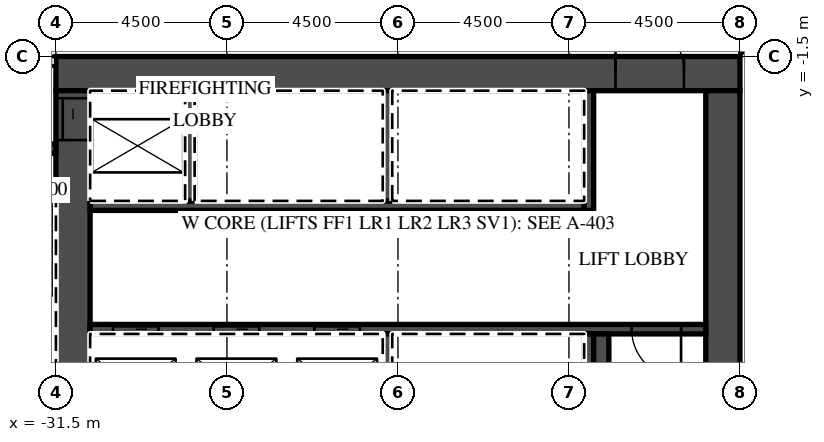
"""IFC4 building model, lengths in metres.
Left out: names, types, materials, properties, quantities, classifications, styles, units other than length and angle.
Written with IfcOpenShell. Run it as: python <this file> out.ifc"""

import sys

from ifc_helpers import new_model, si_unit, direction, frame, frame_2d, origin, place, context, subcontext, project, spatial, rectangle, extrude, element, fill, save


model = new_model("IFC4")
c1 = context("Model", 3, precision=1e-05, world=origin(), true_north=direction((0.0, 1.0)))
c2 = subcontext(c1, "Body", "Model", "MODEL_VIEW")
j1 = project(units=[si_unit("LENGTHUNIT", "METRE"), si_unit("PLANEANGLEUNIT", "RADIAN")], contexts=[c1])
p1 = place(None, origin())
s1 = spatial("IfcSite", under=j1, at=p1, CompositionType="ELEMENT")
p2 = place(p1, origin())
s2 = spatial("IfcBuilding", under=s1, at=p2, CompositionType="ELEMENT")
p3 = place(p2, frame((0.0, 0.0, 114.1)))
s3 = spatial("IfcBuildingStorey", under=s2, at=p3, CompositionType="ELEMENT", Elevation=114.1)
p4 = place(p3, frame((-13.5, -1.3, 0.0), z_axis=(0.0, 0.0, 1.0), x_axis=(1.0, 0.0, 0.0)))
e1 = element("IfcWall", 1, at=p4, inside=s3, PredefinedType="PARTITIONING", context=c2, shape_type="SweptSolid", body=[
    extrude(rectangle(XDim=60.932, YDim=0.2, at=frame_2d((30.466, 0.0))), origin(), (0.0, 0.0, 1.0), 3.02),
])
p5 = place(p4, frame((0.575, 0.0, 0.0)))
e2 = element("IfcOpeningElement", 2, at=p5, cuts=e1, PredefinedType="OPENING", context=c2, shape_type="SweptSolid", body=[
    extrude(rectangle(XDim=1.0, YDim=2.1, at=frame_2d((0.5, 1.05))), frame((0.0, 0.11, 0.0), z_axis=(0.0, -1.0, 0.0), x_axis=(1.0, 0.0, 0.0)), (0.0, 0.0, 1.0), 0.22),
])
p6 = place(p4, frame((5.075, 0.0, 0.0)))
e3 = element("IfcOpeningElement", 3, at=p6, cuts=e1, PredefinedType="OPENING", context=c2, shape_type="SweptSolid", body=[
    extrude(rectangle(XDim=1.0, YDim=2.1, at=frame_2d((0.5, 1.05))), frame((0.0, 0.11, 0.0), z_axis=(0.0, -1.0, 0.0), x_axis=(1.0, 0.0, 0.0)), (0.0, 0.0, 1.0), 0.22),
])
p7 = place(p4, frame((11.925, 0.0, 0.0)))
e4 = element("IfcOpeningElement", 4, at=p7, cuts=e1, PredefinedType="OPENING", context=c2, shape_type="SweptSolid", body=[
    extrude(rectangle(XDim=1.0, YDim=2.1, at=frame_2d((0.5, 1.05))), frame((0.0, 0.11, 0.0), z_axis=(0.0, -1.0, 0.0), x_axis=(1.0, 0.0, 0.0)), (0.0, 0.0, 1.0), 0.22),
])
p8 = place(p4, frame((15.938, 0.0, 0.0)))
e5 = element("IfcOpeningElement", 5, at=p8, cuts=e1, PredefinedType="OPENING", context=c2, shape_type="SweptSolid", body=[
    extrude(rectangle(XDim=1.2, YDim=2.1, at=frame_2d((0.6, 1.05))), frame((0.0, 0.11, 0.0), z_axis=(0.0, -1.0, 0.0), x_axis=(1.0, 0.0, 0.0)), (0.0, 0.0, 1.0), 0.22),
])
p9 = place(p4, frame((25.45, 0.0, 0.0)))
e6 = element("IfcOpeningElement", 6, at=p9, cuts=e1, PredefinedType="OPENING", context=c2, shape_type="SweptSolid", body=[
    extrude(rectangle(XDim=1.0, YDim=2.1, at=frame_2d((0.5, 1.05))), frame((0.0, 0.11, 0.0), z_axis=(0.0, -1.0, 0.0), x_axis=(1.0, 0.0, 0.0)), (0.0, 0.0, 1.0), 0.22),
])
p10 = place(p4, frame((27.55, 0.0, 0.0)))
e7 = element("IfcOpeningElement", 7, at=p10, cuts=e1, PredefinedType="OPENING", context=c2, shape_type="SweptSolid", body=[
    extrude(rectangle(XDim=1.0, YDim=2.1, at=frame_2d((0.5, 1.05))), frame((0.0, 0.11, 0.0), z_axis=(0.0, -1.0, 0.0), x_axis=(1.0, 0.0, 0.0)), (0.0, 0.0, 1.0), 0.22),
])
p11 = place(p4, frame((33.938, 0.0, 0.0)))
e8 = element("IfcOpeningElement", 8, at=p11, cuts=e1, PredefinedType="OPENING", context=c2, shape_type="SweptSolid", body=[
    extrude(rectangle(XDim=1.2, YDim=2.1, at=frame_2d((0.6, 1.05))), frame((0.0, 0.11, 0.0), z_axis=(0.0, -1.0, 0.0), x_axis=(1.0, 0.0, 0.0)), (0.0, 0.0, 1.0), 0.22),
])
p12 = place(p4, frame((45.862, 0.0, 0.0)))
e9 = element("IfcOpeningElement", 9, at=p12, cuts=e1, PredefinedType="OPENING", context=c2, shape_type="SweptSolid", body=[
    extrude(rectangle(XDim=1.2, YDim=2.1, at=frame_2d((0.6, 1.05))), frame((0.0, 0.11, 0.0), z_axis=(0.0, -1.0, 0.0), x_axis=(1.0, 0.0, 0.0)), (0.0, 0.0, 1.0), 0.22),
])
p13 = place(p4, frame((52.425, 0.0, 0.0)))
e10 = element("IfcOpeningElement", 10, at=p13, cuts=e1, PredefinedType="OPENING", context=c2, shape_type="SweptSolid", body=[
    extrude(rectangle(XDim=1.0, YDim=2.1, at=frame_2d((0.5, 1.05))), frame((0.0, 0.11, 0.0), z_axis=(0.0, -1.0, 0.0), x_axis=(1.0, 0.0, 0.0)), (0.0, 0.0, 1.0), 0.22),
])
p14 = place(p4, frame((56.95, 0.0, 0.0)))
e11 = element("IfcOpeningElement", 11, at=p14, cuts=e1, PredefinedType="OPENING", context=c2, shape_type="SweptSolid", body=[
    extrude(rectangle(XDim=1.0, YDim=2.1, at=frame_2d((0.5, 1.05))), frame((0.0, 0.11, 0.0), z_axis=(0.0, -1.0, 0.0), x_axis=(1.0, 0.0, 0.0)), (0.0, 0.0, 1.0), 0.22),
])
p15 = place(p4, frame((59.882, 0.0, 0.0)))
e12 = element("IfcOpeningElement", 12, at=p15, cuts=e1, PredefinedType="OPENING", context=c2, shape_type="SweptSolid", body=[
    extrude(rectangle(XDim=0.9, YDim=2.1, at=frame_2d((0.45, 1.05))), frame((0.0, 0.11, 0.0), z_axis=(0.0, -1.0, 0.0), x_axis=(1.0, 0.0, 0.0)), (0.0, 0.0, 1.0), 0.22),
])
p16 = place(p3, frame((-31.5, -1.95, 0.0), z_axis=(0.0, 0.0, 1.0), x_axis=(1.0, 0.0, 0.0)))
e13 = element("IfcWall", 13, at=p16, inside=s3, PredefinedType="SHEAR", context=c2, shape_type="SweptSolid", body=[
    extrude(rectangle(XDim=18.0, YDim=0.9, at=frame_2d((9.0, 0.0))), origin(), (0.0, 0.0, 1.0), 3.02),
])
p17 = place(p16, frame((14.725, 0.0, 0.0)))
e14 = element("IfcOpeningElement", 14, at=p17, cuts=e13, PredefinedType="OPENING", context=c2, shape_type="SweptSolid", body=[
    extrude(rectangle(XDim=1.8, YDim=2.1, at=frame_2d((0.9, 1.05))), frame((0.0, 0.46, 0.0), z_axis=(0.0, -1.0, 0.0), x_axis=(1.0, 0.0, 0.0)), (0.0, 0.0, 1.0), 0.92),
])
p18 = place(p3, frame((-31.05, -15.2, 0.0), z_axis=(0.0, 0.0, 1.0), x_axis=(0.0, 1.0, 0.0)))
e15 = element("IfcWall", 15, at=p18, inside=s3, PredefinedType="SHEAR", context=c2, shape_type="SweptSolid", body=[
    extrude(rectangle(XDim=12.8, YDim=0.9, at=frame_2d((6.4, 0.0))), origin(), (0.0, 0.0, 1.0), 3.02),
])
p19 = place(p18, frame((11.5, 0.0, 0.0)))
e16 = element("IfcOpeningElement", 16, at=p19, cuts=e15, PredefinedType="OPENING", context=c2, shape_type="SweptSolid", body=[
    extrude(rectangle(XDim=1.1, YDim=2.1, at=frame_2d((0.55, 1.05))), frame((0.0, 0.46, 0.0), z_axis=(0.0, -1.0, 0.0), x_axis=(1.0, 0.0, 0.0)), (0.0, 0.0, 1.0), 0.92),
])
p20 = place(p3, frame((-13.95, -14.6, 0.0), z_axis=(0.0, 0.0, 1.0), x_axis=(0.0, 1.0, 0.0)))
e17 = element("IfcWall", 17, at=p20, inside=s3, PredefinedType="SHEAR", context=c2, shape_type="SweptSolid", body=[
    extrude(rectangle(XDim=12.2, YDim=0.9, at=frame_2d((6.1, 0.0))), origin(), (0.0, 0.0, 1.0), 3.02),
])
p21 = place(p3, frame((-30.6, -5.425, 0.0), z_axis=(0.0, 0.0, 1.0), x_axis=(1.0, 0.0, 0.0)))
e18 = element("IfcWall", 18, at=p21, inside=s3, PredefinedType="SHEAR", context=c2, shape_type="SweptSolid", body=[
    extrude(rectangle(XDim=13.0, YDim=0.25, at=frame_2d((6.5, 0.0))), origin(), (0.0, 0.0, 1.0), 3.02),
])
p22 = place(p3, frame((-17.475, -5.55, 0.0), z_axis=(0.0, 0.0, 1.0), x_axis=(0.0, 1.0, 0.0)))
e19 = element("IfcWall", 19, at=p22, inside=s3, PredefinedType="SHEAR", context=c2, shape_type="SweptSolid", body=[
    extrude(rectangle(XDim=3.15, YDim=0.25, at=frame_2d((1.575, 0.0))), origin(), (0.0, 0.0, 1.0), 3.02),
])
for number, where, z_axis, x_axis in (
    (20, (-27.975, -5.3, 0.0), (0.0, 0.0, 1.0), (0.0, 1.0, 0.0)),
    (21, (-22.775, -5.3, 0.0), (0.0, 0.0, 1.0), (0.0, 1.0, 0.0)),
):
    element("IfcWall", number, at=place(p3, frame(where, z_axis=z_axis, x_axis=x_axis)), inside=s3, PredefinedType="SHEAR", context=c2, shape_type="SweptSolid", body=[
        extrude(rectangle(XDim=2.9, YDim=0.25, at=frame_2d((1.45, 0.0))), origin(), (0.0, 0.0, 1.0), 3.02),
    ])
p23 = place(p3, frame((-30.6, -8.675, 0.0), z_axis=(0.0, 0.0, 1.0), x_axis=(1.0, 0.0, 0.0)))
e22 = element("IfcWall", 22, at=p23, inside=s3, PredefinedType="SHEAR", context=c2, shape_type="SweptSolid", body=[
    extrude(rectangle(XDim=16.2, YDim=0.25, at=frame_2d((8.1, 0.0))), origin(), (0.0, 0.0, 1.0), 3.02),
])
p24 = place(p23, frame((0.6, 0.0, 0.0)))
e23 = element("IfcOpeningElement", 23, at=p24, cuts=e22, PredefinedType="OPENING", context=c2, shape_type="SweptSolid", body=[
    extrude(rectangle(XDim=1.2, YDim=2.1, at=frame_2d((0.6, 1.05))), frame((0.0, 0.135, 0.0), z_axis=(0.0, -1.0, 0.0), x_axis=(1.0, 0.0, 0.0)), (0.0, 0.0, 1.0), 0.27),
])
p25 = place(p23, frame((3.25, 0.0, 0.0)))
e24 = element("IfcOpeningElement", 24, at=p25, cuts=e22, PredefinedType="OPENING", context=c2, shape_type="SweptSolid", body=[
    extrude(rectangle(XDim=1.2, YDim=2.1, at=frame_2d((0.6, 1.05))), frame((0.0, 0.135, 0.0), z_axis=(0.0, -1.0, 0.0), x_axis=(1.0, 0.0, 0.0)), (0.0, 0.0, 1.0), 0.27),
])
p26 = place(p23, frame((5.9, 0.0, 0.0)))
e25 = element("IfcOpeningElement", 25, at=p26, cuts=e22, PredefinedType="OPENING", context=c2, shape_type="SweptSolid", body=[
    extrude(rectangle(XDim=1.2, YDim=2.1, at=frame_2d((0.6, 1.05))), frame((0.0, 0.135, 0.0), z_axis=(0.0, -1.0, 0.0), x_axis=(1.0, 0.0, 0.0)), (0.0, 0.0, 1.0), 0.27),
])
p27 = place(p23, frame((14.25, 0.0, 0.0)))
e26 = element("IfcOpeningElement", 26, at=p27, cuts=e22, PredefinedType="OPENING", context=c2, shape_type="SweptSolid", body=[
    extrude(rectangle(XDim=1.3, YDim=2.1, at=frame_2d((0.65, 1.05))), frame((0.0, 0.135, 0.0), z_axis=(0.0, -1.0, 0.0), x_axis=(1.0, 0.0, 0.0)), (0.0, 0.0, 1.0), 0.27),
])
for number, where, z_axis, x_axis in (
    (27, (-17.475, -11.7, 0.0), (0.0, 0.0, 1.0), (0.0, 1.0, 0.0)),
    (28, (-22.775, -11.7, 0.0), (0.0, 0.0, 1.0), (0.0, 1.0, 0.0)),
):
    element("IfcWall", number, at=place(p3, frame(where, z_axis=z_axis, x_axis=x_axis)), inside=s3, PredefinedType="SHEAR", context=c2, shape_type="SweptSolid", body=[
        extrude(rectangle(XDim=2.9, YDim=0.25, at=frame_2d((1.45, 0.0))), origin(), (0.0, 0.0, 1.0), 3.02),
    ])
p28 = place(p3, frame((-17.15, -14.6, 0.0), z_axis=(0.0, 0.0, 1.0), x_axis=(0.0, 1.0, 0.0)))
e29 = element("IfcWall", 29, at=p28, inside=s3, PredefinedType="SHEAR", context=c2, shape_type="SweptSolid", body=[
    extrude(rectangle(XDim=5.8, YDim=0.4, at=frame_2d((2.9, 0.0))), origin(), (0.0, 0.0, 1.0), 3.02),
])
p29 = place(p3, frame((-39.035, -1.625, 0.0), z_axis=(0.0, 0.0, 1.0), x_axis=(1.0, 0.0, 0.0)))
e30 = element("IfcWall", 30, at=p29, inside=s3, PredefinedType="PARTITIONING", context=c2, shape_type="SweptSolid", body=[
    extrude(rectangle(XDim=7.535, YDim=0.25, at=frame_2d((3.768, 0.0))), origin(), (0.0, 0.0, 1.0), 3.02),
])
p30 = place(p29, frame((5.61, 0.0, 0.0)))
e31 = element("IfcOpeningElement", 31, at=p30, cuts=e30, PredefinedType="OPENING", context=c2, shape_type="SweptSolid", body=[
    extrude(rectangle(XDim=1.3, YDim=2.1, at=frame_2d((0.65, 1.05))), frame((0.0, 0.135, 0.0), z_axis=(0.0, -1.0, 0.0), x_axis=(1.0, 0.0, 0.0)), (0.0, 0.0, 1.0), 0.27),
])
p31 = place(p29, frame((3.185, 0.0, 0.0)))
e32 = element("IfcOpeningElement", 32, at=p31, cuts=e30, PredefinedType="OPENING", context=c2, shape_type="SweptSolid", body=[
    extrude(rectangle(XDim=1.1, YDim=2.1, at=frame_2d((0.55, 1.05))), frame((0.0, 0.135, 0.0), z_axis=(0.0, -1.0, 0.0), x_axis=(1.0, 0.0, 0.0)), (0.0, 0.0, 1.0), 0.27),
])
p32 = place(p3, frame((-34.05, -3.925, 0.0), z_axis=(0.0, 0.0, 1.0), x_axis=(1.0, 0.0, 0.0)))
e33 = element("IfcWall", 33, at=p32, inside=s3, PredefinedType="SHEAR", context=c2, shape_type="SweptSolid", body=[
    extrude(rectangle(XDim=2.55, YDim=0.25, at=frame_2d((1.275, 0.0))), origin(), (0.0, 0.0, 1.0), 3.02),
])
p33 = place(p32, frame((0.625, 0.0, 0.0)))
e34 = element("IfcOpeningElement", 34, at=p33, cuts=e33, PredefinedType="OPENING", context=c2, shape_type="SweptSolid", body=[
    extrude(rectangle(XDim=1.3, YDim=2.1, at=frame_2d((0.65, 1.05))), frame((0.0, 0.135, 0.0), z_axis=(0.0, -1.0, 0.0), x_axis=(1.0, 0.0, 0.0)), (0.0, 0.0, 1.0), 0.27),
])
p34 = place(p24, origin())
e35 = element("IfcDoor", 35, at=p34, inside=s3, OperationType="SLIDING_TO_LEFT", PredefinedType="DOOR", context=c2, shape_type="SweptSolid", body=[
    extrude(rectangle(XDim=1.2, YDim=2.1, at=frame_2d((0.6, 1.05))), frame((0.0, 0.025, 0.0), z_axis=(0.0, -1.0, 0.0), x_axis=(1.0, 0.0, 0.0)), (0.0, 0.0, 1.0), 0.05),
])
fill(e23, e35)
p35 = place(p25, origin())
e36 = element("IfcDoor", 36, at=p35, inside=s3, OperationType="SLIDING_TO_RIGHT", PredefinedType="DOOR", context=c2, shape_type="SweptSolid", body=[
    extrude(rectangle(XDim=1.2, YDim=2.1, at=frame_2d((0.6, 1.05))), frame((0.0, 0.025, 0.0), z_axis=(0.0, -1.0, 0.0), x_axis=(1.0, 0.0, 0.0)), (0.0, 0.0, 1.0), 0.05),
])
fill(e24, e36)
p36 = place(p26, origin())
e37 = element("IfcDoor", 37, at=p36, inside=s3, OperationType="SLIDING_TO_RIGHT", PredefinedType="DOOR", context=c2, shape_type="SweptSolid", body=[
    extrude(rectangle(XDim=1.2, YDim=2.1, at=frame_2d((0.6, 1.05))), frame((0.0, 0.025, 0.0), z_axis=(0.0, -1.0, 0.0), x_axis=(1.0, 0.0, 0.0)), (0.0, 0.0, 1.0), 0.05),
])
fill(e25, e37)
p37 = place(p19, origin())
e38 = element("IfcDoor", 38, at=p37, inside=s3, OperationType="SLIDING_TO_RIGHT", PredefinedType="DOOR", context=c2, shape_type="SweptSolid", body=[
    extrude(rectangle(XDim=1.1, YDim=2.1, at=frame_2d((0.55, 1.05))), frame((0.0, 0.025, 0.0), z_axis=(0.0, -1.0, 0.0), x_axis=(1.0, 0.0, 0.0)), (0.0, 0.0, 1.0), 0.05),
])
fill(e16, e38)
p38 = place(p17, origin())
e39 = element("IfcDoor", 39, at=p38, inside=s3, OperationType="DOUBLE_DOOR_DOUBLE_SWING", PredefinedType="DOOR", context=c2, shape_type="SweptSolid", body=[
    extrude(rectangle(XDim=1.8, YDim=2.1, at=frame_2d((0.9, 1.05))), frame((0.0, 0.025, 0.0), z_axis=(0.0, -1.0, 0.0), x_axis=(1.0, 0.0, 0.0)), (0.0, 0.0, 1.0), 0.05),
])
fill(e14, e39)
p39 = place(p27, origin())
e40 = element("IfcDoor", 40, at=p39, inside=s3, OperationType="SINGLE_SWING_RIGHT", PredefinedType="DOOR", context=c2, shape_type="SweptSolid", body=[
    extrude(rectangle(XDim=1.3, YDim=2.1, at=frame_2d((0.65, 1.05))), frame((0.0, 0.025, 0.0), z_axis=(0.0, -1.0, 0.0), x_axis=(1.0, 0.0, 0.0)), (0.0, 0.0, 1.0), 0.05),
])
fill(e26, e40)
save(model, sys.argv[1])
